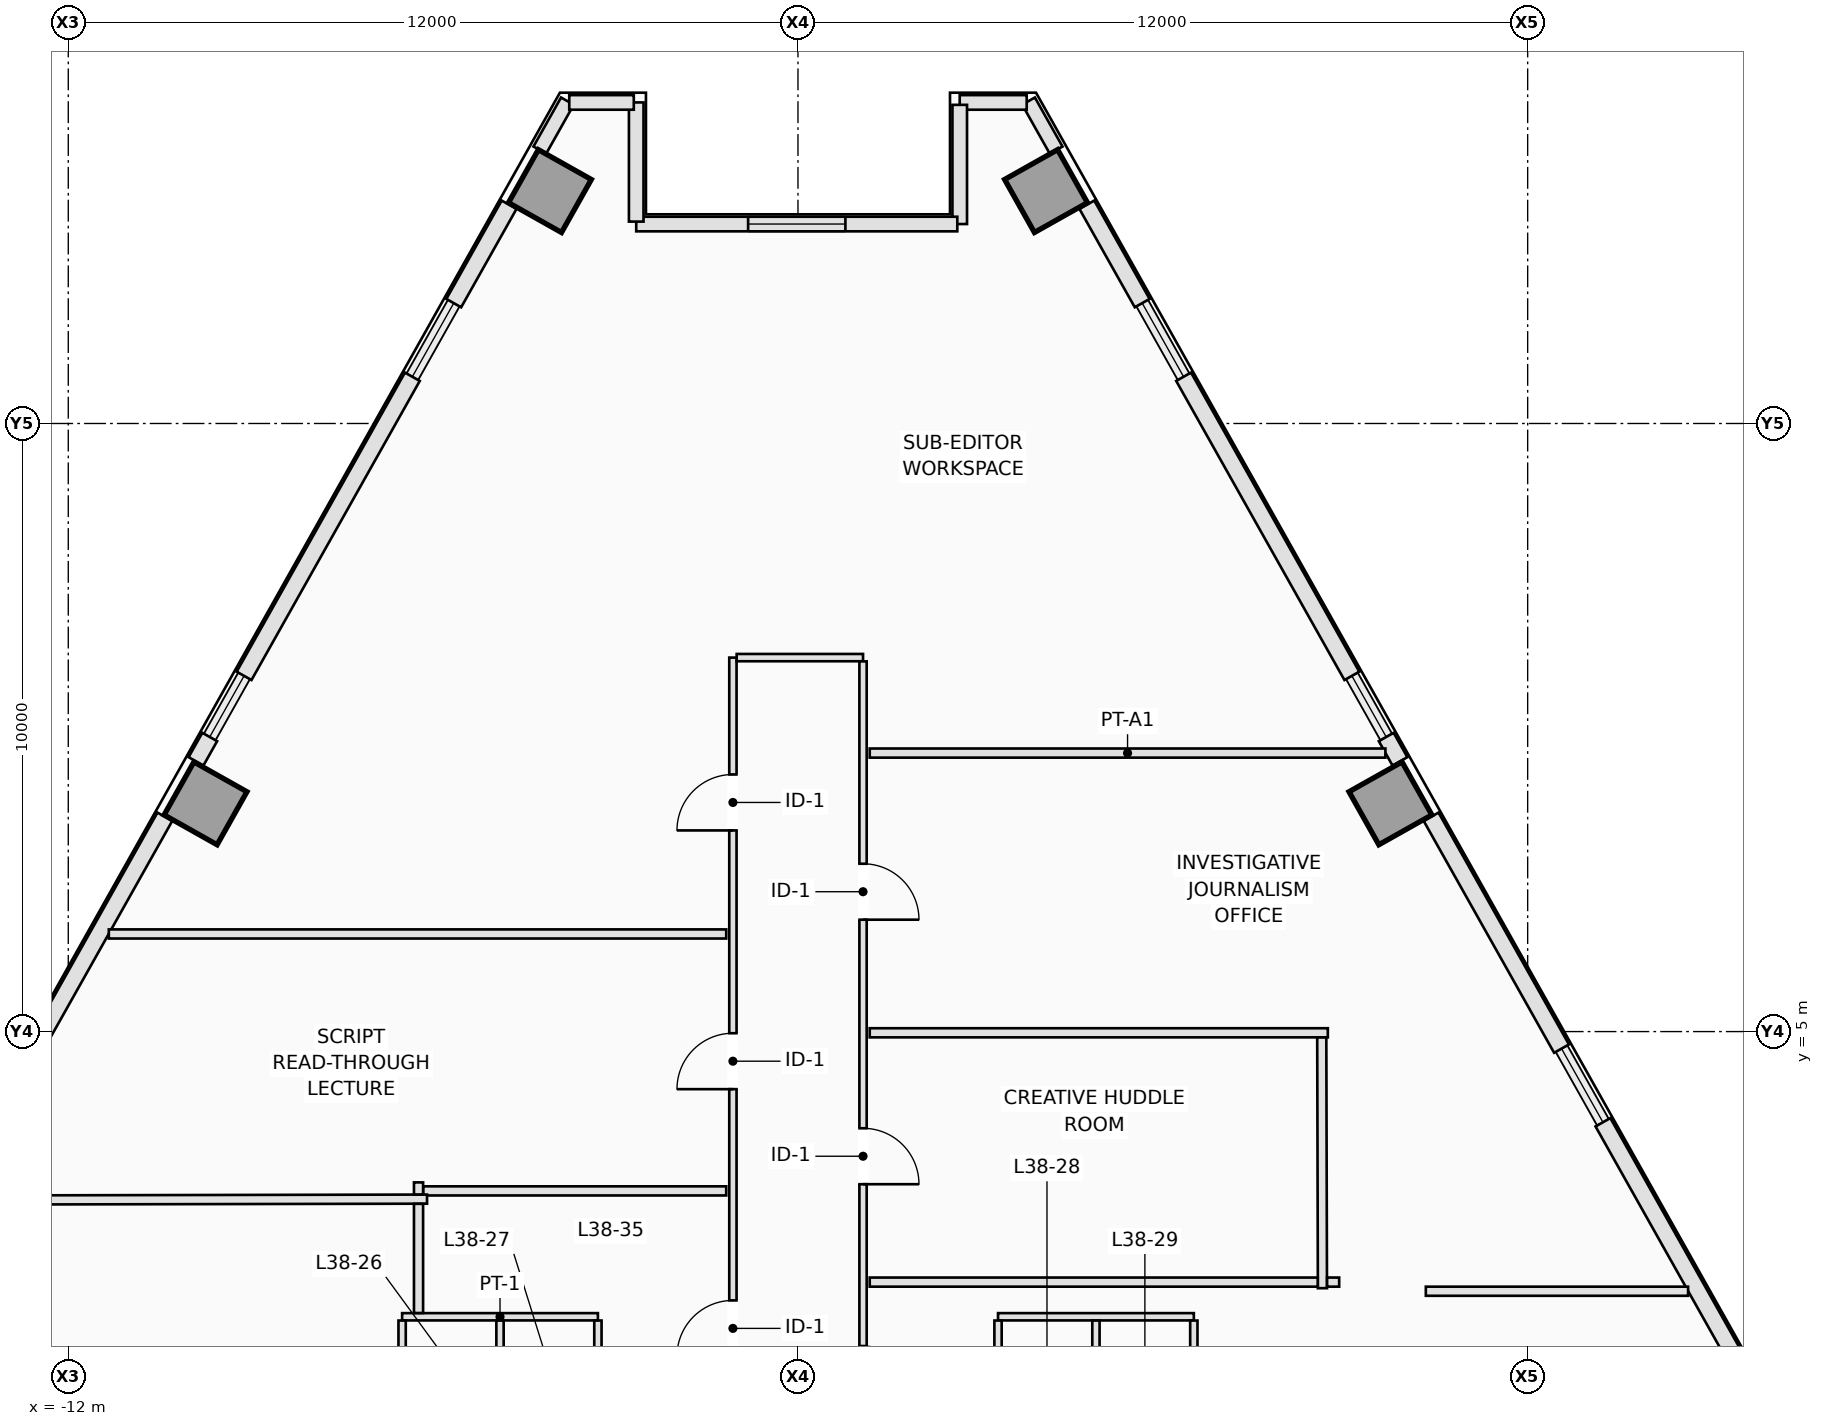
"""IFC4 building model, lengths in metres.
Left out: names, types, materials, properties, quantities, classifications, styles, units other than length and angle.
Written with IfcOpenShell. Run it as: python <this file> out.ifc"""

import sys

from ifc_helpers import new_model, si_unit, direction, frame, frame_2d, origin, origin_2d, place, context, subcontext, project, spatial, rectangle, extrude, element, fill, save


model = new_model("IFC4")
c1 = context("Model", 3, precision=1e-05, world=origin(), true_north=direction((0.0, 1.0)))
c2 = subcontext(c1, "Body", "Model", "MODEL_VIEW")
j1 = project(units=[si_unit("LENGTHUNIT", "METRE"), si_unit("PLANEANGLEUNIT", "RADIAN")], contexts=[c1])
p1 = place(None, origin())
s1 = spatial("IfcSite", under=j1, at=p1, CompositionType="ELEMENT")
p2 = place(p1, origin())
s2 = spatial("IfcBuilding", under=s1, at=p2, CompositionType="ELEMENT")
p3 = place(p2, frame((0.0, 0.0, 140.5)))
s3 = spatial("IfcBuildingStorey", under=s2, at=p3, CompositionType="ELEMENT", Elevation=140.5)
for number, where, z_axis, x_axis in (
    (1, (9.743, 8.753, 0.0), (0.0, 0.0, 1.0), (0.872, 0.49, 0.0)),
    (2, (4.079, 18.822, 0.0), (0.0, 0.0, 1.0), (0.872, 0.49, 0.0)),
    (3, (-4.079, 18.822, 0.0), (0.0, 0.0, 1.0), (-0.872, 0.49, 0.0)),
    (4, (-9.743, 8.753, 0.0), (0.0, 0.0, 1.0), (-0.872, 0.49, 0.0)),
):
    element("IfcColumn", number, at=place(p3, frame(where, z_axis=z_axis, x_axis=x_axis)), inside=s3, PredefinedType="COLUMN", context=c2, shape_type="SweptSolid", body=[
        extrude(rectangle(XDim=1.0, YDim=1.0, at=origin_2d()), origin(), (0.0, 0.0, 1.0), 3.5),
    ])
p4 = place(p3, frame((3.792, 20.302, 0.0), z_axis=(0.0, 0.0, 1.0), x_axis=(0.490048346303, -0.871695255399, 0.0)))
e5 = element("IfcWall", 5, at=p4, inside=s3, PredefinedType="STANDARD", context=c2, shape_type="SweptSolid", body=[
    extrude(rectangle(XDim=0.926, YDim=0.24, at=frame_2d((0.463, 0.0))), origin(), (0.0, 0.0, 1.0), 3.25),
])
p5 = place(p3, frame((4.751, 18.597, 0.0), z_axis=(0.0, 0.0, 1.0), x_axis=(0.490248749158, -0.871582562899, 0.0)))
e6 = element("IfcWall", 6, at=p5, inside=s3, PredefinedType="STANDARD", context=c2, shape_type="SweptSolid", body=[
    extrude(rectangle(XDim=1.856, YDim=0.28, at=frame_2d((0.928, 0.0))), origin(), (0.0, 0.0, 1.0), 3.25),
])
p6 = place(p3, frame((6.342, 15.768, 0.0), z_axis=(0.0, 0.0, 1.0), x_axis=(0.490289995219, -0.871559361483, 0.0)))
e7 = element("IfcWall", 7, at=p6, inside=s3, PredefinedType="STANDARD", context=c2, shape_type="SweptSolid", body=[
    extrude(rectangle(XDim=5.643, YDim=0.28, at=frame_2d((2.822, 0.0))), origin(), (0.0, 0.0, 1.0), 3.25),
])
p7 = place(p3, frame((9.674, 9.845, 0.0), z_axis=(0.0, 0.0, 1.0), x_axis=(0.490412424957, -0.871490478116, 0.0)))
e8 = element("IfcWall", 8, at=p7, inside=s3, PredefinedType="STANDARD", context=c2, shape_type="SweptSolid", body=[
    extrude(rectangle(XDim=0.46, YDim=0.28, at=frame_2d((0.23, 0.0))), origin(), (0.0, 0.0, 1.0), 3.25),
])
p8 = place(p3, frame((10.412, 8.533, 0.0), z_axis=(0.0, 0.0, 1.0), x_axis=(0.490274486291, -0.871568085747, 0.0)))
e9 = element("IfcWall", 9, at=p8, inside=s3, PredefinedType="STANDARD", context=c2, shape_type="SweptSolid", body=[
    extrude(rectangle(XDim=4.375, YDim=0.28, at=frame_2d((2.188, 0.0))), origin(), (0.0, 0.0, 1.0), 3.25),
])
p9 = place(p3, frame((13.238, 3.509, 0.0), z_axis=(0.0, 0.0, 1.0), x_axis=(0.490232095789, -0.871591929895, 0.0)))
e10 = element("IfcWall", 10, at=p9, inside=s3, PredefinedType="STANDARD", context=c2, shape_type="SweptSolid", body=[
    extrude(rectangle(XDim=4.375, YDim=0.28, at=frame_2d((2.188, 0.0))), origin(), (0.0, 0.0, 1.0), 3.25),
])
p10 = place(p3, frame((-4.246, 19.495, 0.0), z_axis=(0.0, 0.0, 1.0), x_axis=(0.490048346303, 0.871695255399, 0.0)))
e11 = element("IfcWall", 11, at=p10, inside=s3, PredefinedType="STANDARD", context=c2, shape_type="SweptSolid", body=[
    extrude(rectangle(XDim=0.926, YDim=0.24, at=frame_2d((0.463, 0.0))), origin(), (0.0, 0.0, 1.0), 3.25),
])
p11 = place(p3, frame((-9.9, 9.444, 0.0), z_axis=(0.0, 0.0, 1.0), x_axis=(0.490412424957, 0.871490478116, 0.0)))
e12 = element("IfcWall", 12, at=p11, inside=s3, PredefinedType="STANDARD", context=c2, shape_type="SweptSolid", body=[
    extrude(rectangle(XDim=0.46, YDim=0.28, at=frame_2d((0.23, 0.0))), origin(), (0.0, 0.0, 1.0), 3.25),
])
p12 = place(p3, frame((-9.109, 10.85, 0.0), z_axis=(0.0, 0.0, 1.0), x_axis=(0.490289995219, 0.871559361483, 0.0)))
e13 = element("IfcWall", 13, at=p12, inside=s3, PredefinedType="STANDARD", context=c2, shape_type="SweptSolid", body=[
    extrude(rectangle(XDim=5.643, YDim=0.28, at=frame_2d((2.822, 0.0))), origin(), (0.0, 0.0, 1.0), 3.25),
])
p13 = place(p3, frame((-5.661, 16.98, 0.0), z_axis=(0.0, 0.0, 1.0), x_axis=(0.490248749158, 0.871582562899, 0.0)))
e14 = element("IfcWall", 14, at=p13, inside=s3, PredefinedType="STANDARD", context=c2, shape_type="SweptSolid", body=[
    extrude(rectangle(XDim=1.856, YDim=0.28, at=frame_2d((0.928, 0.0))), origin(), (0.0, 0.0, 1.0), 3.25),
])
p14 = place(p3, frame((-12.557, 4.72, 0.0), z_axis=(0.0, 0.0, 1.0), x_axis=(0.490274486291, 0.871568085747, 0.0)))
e15 = element("IfcWall", 15, at=p14, inside=s3, PredefinedType="STANDARD", context=c2, shape_type="SweptSolid", body=[
    extrude(rectangle(XDim=4.375, YDim=0.28, at=frame_2d((2.188, 0.0))), origin(), (0.0, 0.0, 1.0), 3.25),
])
p15 = place(p3, frame((3.761, 20.28, 0.0), z_axis=(0.0, 0.0, 1.0), x_axis=(-1.0, 0.0, 0.0)))
e16 = element("IfcWall", 16, at=p15, inside=s3, PredefinedType="STANDARD", context=c2, shape_type="SweptSolid", body=[
    extrude(rectangle(XDim=1.102, YDim=0.24, at=frame_2d((0.551, 0.0))), origin(), (0.0, 0.0, 1.0), 3.25),
])
p16 = place(p3, frame((2.66, 20.24, 0.0), z_axis=(0.0, 0.0, 1.0), x_axis=(0.0, -1.0, 0.0)))
e17 = element("IfcWall", 17, at=p16, inside=s3, PredefinedType="STANDARD", context=c2, shape_type="SweptSolid", body=[
    extrude(rectangle(XDim=1.96, YDim=0.24, at=frame_2d((0.98, 0.0))), origin(), (0.0, 0.0, 1.0), 3.25),
])
p17 = place(p3, frame((2.62, 18.28, 0.0), z_axis=(0.0, 0.0, 1.0), x_axis=(-1.0, 0.0, 0.0)))
e18 = element("IfcWall", 18, at=p17, inside=s3, PredefinedType="STANDARD", context=c2, shape_type="SweptSolid", body=[
    extrude(rectangle(XDim=5.28, YDim=0.24, at=frame_2d((2.64, 0.0))), origin(), (0.0, 0.0, 1.0), 3.25),
])
p18 = place(p17, frame((1.84, 0.0, 0.9)))
e19 = element("IfcOpeningElement", 19, at=p18, cuts=e18, PredefinedType="OPENING", context=c2, shape_type="SweptSolid", body=[
    extrude(rectangle(XDim=1.6, YDim=2.1, at=frame_2d((0.8, 1.05))), frame((0.0, 0.13, 0.0), z_axis=(0.0, -1.0, 0.0), x_axis=(1.0, 0.0, 0.0)), (0.0, 0.0, 1.0), 0.26),
])
p19 = place(p3, frame((-2.66, 18.32, 0.0), z_axis=(0.0, 0.0, 1.0), x_axis=(0.0, 1.0, 0.0)))
e20 = element("IfcWall", 20, at=p19, inside=s3, PredefinedType="STANDARD", context=c2, shape_type="SweptSolid", body=[
    extrude(rectangle(XDim=1.96, YDim=0.24, at=frame_2d((0.98, 0.0))), origin(), (0.0, 0.0, 1.0), 3.25),
])
p20 = place(p3, frame((-2.7, 20.28, 0.0), z_axis=(0.0, 0.0, 1.0), x_axis=(-1.0, 0.0, 0.0)))
e21 = element("IfcWall", 21, at=p20, inside=s3, PredefinedType="STANDARD", context=c2, shape_type="SweptSolid", body=[
    extrude(rectangle(XDim=1.062, YDim=0.24, at=frame_2d((0.531, 0.0))), origin(), (0.0, 0.0, 1.0), 3.25),
])
p21 = place(p3, frame((-6.51, 0.31, 0.0), z_axis=(0.0, 0.0, 1.0), x_axis=(1.0, 0.0, 0.0)))
e22 = element("IfcWall", 22, at=p21, inside=s3, PredefinedType="PARTITIONING", context=c2, shape_type="SweptSolid", body=[
    extrude(rectangle(XDim=3.22, YDim=0.12, at=frame_2d((1.61, 0.0))), origin(), (0.0, 0.0, 1.0), 3.25),
])
for number, where, z_axis, x_axis in (
    (23, (-6.51, -2.378, 0.0), (0.0, 0.0, 1.0), (0.0, 1.0, 0.0)),
    (24, (-4.9, -2.378, 0.0), (0.0, 0.0, 1.0), (0.0, 1.0, 0.0)),
    (25, (-3.29, -2.378, 0.0), (0.0, 0.0, 1.0), (0.0, 1.0, 0.0)),
):
    element("IfcWall", number, at=place(p3, frame(where, z_axis=z_axis, x_axis=x_axis)), inside=s3, PredefinedType="PARTITIONING", context=c2, shape_type="SweptSolid", body=[
        extrude(rectangle(XDim=2.626, YDim=0.12, at=frame_2d((1.313, 0.0))), origin(), (0.0, 0.0, 1.0), 3.25),
    ])
p22 = place(p3, frame((3.29, 0.31, 0.0), z_axis=(0.0, 0.0, 1.0), x_axis=(1.0, 0.0, 0.0)))
e26 = element("IfcWall", 26, at=p22, inside=s3, PredefinedType="PARTITIONING", context=c2, shape_type="SweptSolid", body=[
    extrude(rectangle(XDim=3.22, YDim=0.12, at=frame_2d((1.61, 0.0))), origin(), (0.0, 0.0, 1.0), 3.25),
])
for number, where, z_axis, x_axis in (
    (27, (3.29, -2.378, 0.0), (0.0, 0.0, 1.0), (0.0, 1.0, 0.0)),
    (28, (4.9, -2.378, 0.0), (0.0, 0.0, 1.0), (0.0, 1.0, 0.0)),
    (29, (6.51, -2.378, 0.0), (0.0, 0.0, 1.0), (0.0, 1.0, 0.0)),
):
    element("IfcWall", number, at=place(p3, frame(where, z_axis=z_axis, x_axis=x_axis)), inside=s3, PredefinedType="PARTITIONING", context=c2, shape_type="SweptSolid", body=[
        extrude(rectangle(XDim=2.626, YDim=0.12, at=frame_2d((1.313, 0.0))), origin(), (0.0, 0.0, 1.0), 3.25),
    ])
p23 = place(p3, frame((-1.07, -2.338, 0.0), z_axis=(0.0, 0.0, 1.0), x_axis=(0.0, 1.0, 0.0)))
e30 = element("IfcWall", 30, at=p23, inside=s3, PredefinedType="PARTITIONING", context=c2, shape_type="SweptSolid", body=[
    extrude(rectangle(XDim=13.488, YDim=0.12, at=frame_2d((6.744, 0.0))), origin(), (0.0, 0.0, 1.0), 3.25),
])
p24 = place(p23, frame((10.646, 0.0, 0.0)))
e31 = element("IfcOpeningElement", 31, at=p24, cuts=e30, PredefinedType="OPENING", context=c2, shape_type="SweptSolid", body=[
    extrude(rectangle(XDim=0.92, YDim=2.12, at=frame_2d((0.46, 1.06))), frame((0.0, 0.07, 0.0), z_axis=(0.0, -1.0, 0.0), x_axis=(1.0, 0.0, 0.0)), (0.0, 0.0, 1.0), 0.14),
])
p25 = place(p23, frame((6.391, 0.0, 0.0)))
e32 = element("IfcOpeningElement", 32, at=p25, cuts=e30, PredefinedType="OPENING", context=c2, shape_type="SweptSolid", body=[
    extrude(rectangle(XDim=0.92, YDim=2.12, at=frame_2d((0.46, 1.06))), frame((0.0, 0.07, 0.0), z_axis=(0.0, -1.0, 0.0), x_axis=(1.0, 0.0, 0.0)), (0.0, 0.0, 1.0), 0.14),
])
p26 = place(p23, frame((1.997, 0.0, 0.0)))
e33 = element("IfcOpeningElement", 33, at=p26, cuts=e30, PredefinedType="OPENING", context=c2, shape_type="SweptSolid", body=[
    extrude(rectangle(XDim=0.92, YDim=2.12, at=frame_2d((0.46, 1.06))), frame((0.0, 0.07, 0.0), z_axis=(0.0, -1.0, 0.0), x_axis=(1.0, 0.0, 0.0)), (0.0, 0.0, 1.0), 0.14),
])
p27 = place(p3, frame((-1.008, 11.15, 0.0), z_axis=(0.0, 0.0, 1.0), x_axis=(1.0, 0.0, 0.0)))
e34 = element("IfcWall", 34, at=p27, inside=s3, PredefinedType="PARTITIONING", context=c2, shape_type="SweptSolid", body=[
    extrude(rectangle(XDim=2.078, YDim=0.12, at=frame_2d((1.039, 0.0))), origin(), (0.0, 0.0, 1.0), 3.25),
])
p28 = place(p3, frame((1.07, 11.088, 0.0), z_axis=(0.0, 0.0, 1.0), x_axis=(0.0, -1.0, 0.0)))
e35 = element("IfcWall", 35, at=p28, inside=s3, PredefinedType="PARTITIONING", context=c2, shape_type="SweptSolid", body=[
    extrude(rectangle(XDim=13.488, YDim=0.12, at=frame_2d((6.744, 0.0))), origin(), (0.0, 0.0, 1.0), 3.25),
])
p29 = place(p28, frame((3.328, 0.0, 0.0)))
e36 = element("IfcOpeningElement", 36, at=p29, cuts=e35, PredefinedType="OPENING", context=c2, shape_type="SweptSolid", body=[
    extrude(rectangle(XDim=0.92, YDim=2.12, at=frame_2d((0.46, 1.06))), frame((0.0, 0.07, 0.0), z_axis=(0.0, -1.0, 0.0), x_axis=(1.0, 0.0, 0.0)), (0.0, 0.0, 1.0), 0.14),
])
p30 = place(p28, frame((7.678, 0.0, 0.0)))
e37 = element("IfcOpeningElement", 37, at=p30, cuts=e35, PredefinedType="OPENING", context=c2, shape_type="SweptSolid", body=[
    extrude(rectangle(XDim=0.92, YDim=2.12, at=frame_2d((0.46, 1.06))), frame((0.0, 0.07, 0.0), z_axis=(0.0, -1.0, 0.0), x_axis=(1.0, 0.0, 0.0)), (0.0, 0.0, 1.0), 0.14),
])
p31 = place(p28, frame((11.259, 0.0, 0.0)))
e38 = element("IfcOpeningElement", 38, at=p31, cuts=e35, PredefinedType="OPENING", context=c2, shape_type="SweptSolid", body=[
    extrude(rectangle(XDim=0.92, YDim=2.12, at=frame_2d((0.46, 1.06))), frame((0.0, 0.07, 0.0), z_axis=(0.0, -1.0, 0.0), x_axis=(1.0, 0.0, 0.0)), (0.0, 0.0, 1.0), 0.14),
])
p32 = place(p3, frame((9.66, 9.58, 0.0), z_axis=(0.0, 0.0, 1.0), x_axis=(-1.0, 0.0, 0.0)))
e39 = element("IfcWall", 39, at=p32, inside=s3, PredefinedType="PARTITIONING", context=c2, shape_type="SweptSolid", body=[
    extrude(rectangle(XDim=8.48, YDim=0.15, at=frame_2d((4.24, 0.0))), origin(), (0.0, 0.0, 1.0), 3.25),
])
p33 = place(p3, frame((-1.18, 6.605, 0.0), z_axis=(0.0, 0.0, 1.0), x_axis=(-1.0, 0.0, 0.0)))
e40 = element("IfcWall", 40, at=p33, inside=s3, PredefinedType="PARTITIONING", context=c2, shape_type="SweptSolid", body=[
    extrude(rectangle(XDim=10.153, YDim=0.15, at=frame_2d((5.077, 0.0))), origin(), (0.0, 0.0, 1.0), 2.891),
])
p34 = place(p3, frame((8.714, 4.98, 0.0), z_axis=(0.0, 0.0, 1.0), x_axis=(-1.0, 0.0, 0.0)))
e41 = element("IfcWall", 41, at=p34, inside=s3, PredefinedType="PARTITIONING", context=c2, shape_type="SweptSolid", body=[
    extrude(rectangle(XDim=7.534, YDim=0.15, at=frame_2d((3.767, 0.0))), origin(), (0.0, 0.0, 1.0), 3.25),
])
p35 = place(p3, frame((8.625, 0.78, 0.0), z_axis=(0.0, 0.0, 1.0), x_axis=(-0.002664604467, 0.999996449935, 0.0)))
e42 = element("IfcWall", 42, at=p35, inside=s3, PredefinedType="PARTITIONING", context=c2, shape_type="SweptSolid", body=[
    extrude(rectangle(XDim=4.123, YDim=0.15, at=frame_2d((2.062, 0.0))), origin(), (0.0, 0.0, 1.0), 3.25),
])
p36 = place(p3, frame((14.638, 0.73, 0.0), z_axis=(0.0, 0.0, 1.0), x_axis=(-1.0, 0.0, 0.0)))
e43 = element("IfcWall", 43, at=p36, inside=s3, PredefinedType="PARTITIONING", context=c2, shape_type="SweptSolid", body=[
    extrude(rectangle(XDim=4.313, YDim=0.15, at=frame_2d((2.156, 0.0))), origin(), (0.0, 0.0, 1.0), 3.25),
])
p37 = place(p3, frame((-1.18, 2.38, 0.0), z_axis=(0.0, 0.0, 1.0), x_axis=(-1.0, 0.0, 0.0)))
e44 = element("IfcWall", 44, at=p37, inside=s3, PredefinedType="PARTITIONING", context=c2, shape_type="SweptSolid", body=[
    extrude(rectangle(XDim=4.985, YDim=0.15, at=frame_2d((2.492, 0.0))), origin(), (0.0, 0.0, 1.0), 3.25),
])
p38 = place(p3, frame((-6.1, 2.245, 0.0), z_axis=(0.0, 0.0, 1.0), x_axis=(-0.999998126996, -0.001935459776, 0.0)))
e45 = element("IfcWall", 45, at=p38, inside=s3, PredefinedType="PARTITIONING", context=c2, shape_type="SweptSolid", body=[
    extrude(rectangle(XDim=7.695, YDim=0.15, at=frame_2d((3.847, 0.0))), origin(), (0.0, 0.0, 1.0), 3.25),
])
p39 = place(p3, frame((8.9, 0.88, 0.0), z_axis=(0.0, 0.0, 1.0), x_axis=(-1.0, 0.0, 0.0)))
e46 = element("IfcWall", 46, at=p39, inside=s3, PredefinedType="PARTITIONING", context=c2, shape_type="SweptSolid", body=[
    extrude(rectangle(XDim=0.198, YDim=0.15, at=frame_2d((0.099, 0.0))), origin(), (0.0, 0.0, 1.0), 3.25),
])
p40 = place(p3, frame((8.548, 0.88, 0.0), z_axis=(0.0, 0.0, 1.0), x_axis=(-1.0, 0.0, 0.0)))
e47 = element("IfcWall", 47, at=p40, inside=s3, PredefinedType="PARTITIONING", context=c2, shape_type="SweptSolid", body=[
    extrude(rectangle(XDim=7.368, YDim=0.15, at=frame_2d((3.684, 0.0))), origin(), (0.0, 0.0, 1.0), 3.25),
])
p41 = place(p3, frame((-6.24, 0.372, 0.0), z_axis=(0.0, 0.0, 1.0), x_axis=(0.0, 1.0, 0.0)))
e48 = element("IfcWall", 48, at=p41, inside=s3, PredefinedType="PARTITIONING", context=c2, shape_type="SweptSolid", body=[
    extrude(rectangle(XDim=1.795, YDim=0.15, at=frame_2d((0.898, 0.0))), origin(), (0.0, 0.0, 1.0), 3.25),
])
p42 = place(p3, frame((-6.24, 2.321, 0.0), z_axis=(0.0, 0.0, 1.0), x_axis=(0.0, 1.0, 0.0)))
e49 = element("IfcWall", 49, at=p42, inside=s3, PredefinedType="PARTITIONING", context=c2, shape_type="SweptSolid", body=[
    extrude(rectangle(XDim=0.199, YDim=0.15, at=frame_2d((0.099, 0.0))), origin(), (0.0, 0.0, 1.0), 3.25),
])
p43 = place(p18, origin())
e50 = element("IfcWindow", 50, at=p43, inside=s3, PartitioningType="SINGLE_PANEL", PredefinedType="WINDOW", context=c2, shape_type="SweptSolid", body=[
    extrude(rectangle(XDim=1.6, YDim=2.1, at=frame_2d((0.8, 1.05))), frame((0.0, 0.03, 0.0), z_axis=(0.0, -1.0, 0.0), x_axis=(1.0, 0.0, 0.0)), (0.0, 0.0, 1.0), 0.06),
])
fill(e19, e50)
p44 = place(p24, origin())
e51 = element("IfcDoor", 51, at=p44, inside=s3, OperationType="SINGLE_SWING_LEFT", PredefinedType="DOOR", context=c2, shape_type="SweptSolid", body=[
    extrude(rectangle(XDim=0.92, YDim=2.12, at=frame_2d((0.46, 1.06))), frame((0.0, 0.025, 0.0), z_axis=(0.0, -1.0, 0.0), x_axis=(1.0, 0.0, 0.0)), (0.0, 0.0, 1.0), 0.05),
])
fill(e31, e51)
p45 = place(p29, origin())
e52 = element("IfcDoor", 52, at=p45, inside=s3, OperationType="SINGLE_SWING_RIGHT", PredefinedType="DOOR", context=c2, shape_type="SweptSolid", body=[
    extrude(rectangle(XDim=0.92, YDim=2.12, at=frame_2d((0.46, 1.06))), frame((0.0, 0.025, 0.0), z_axis=(0.0, -1.0, 0.0), x_axis=(1.0, 0.0, 0.0)), (0.0, 0.0, 1.0), 0.05),
])
fill(e36, e52)
p46 = place(p25, origin())
e53 = element("IfcDoor", 53, at=p46, inside=s3, OperationType="SINGLE_SWING_LEFT", PredefinedType="DOOR", context=c2, shape_type="SweptSolid", body=[
    extrude(rectangle(XDim=0.92, YDim=2.12, at=frame_2d((0.46, 1.06))), frame((0.0, 0.025, 0.0), z_axis=(0.0, -1.0, 0.0), x_axis=(1.0, 0.0, 0.0)), (0.0, 0.0, 1.0), 0.05),
])
fill(e32, e53)
p47 = place(p30, origin())
e54 = element("IfcDoor", 54, at=p47, inside=s3, OperationType="SINGLE_SWING_RIGHT", PredefinedType="DOOR", context=c2, shape_type="SweptSolid", body=[
    extrude(rectangle(XDim=0.92, YDim=2.12, at=frame_2d((0.46, 1.06))), frame((0.0, 0.025, 0.0), z_axis=(0.0, -1.0, 0.0), x_axis=(1.0, 0.0, 0.0)), (0.0, 0.0, 1.0), 0.05),
])
fill(e37, e54)
p48 = place(p26, origin())
e55 = element("IfcDoor", 55, at=p48, inside=s3, OperationType="SINGLE_SWING_LEFT", PredefinedType="DOOR", context=c2, shape_type="SweptSolid", body=[
    extrude(rectangle(XDim=0.92, YDim=2.12, at=frame_2d((0.46, 1.06))), frame((0.0, 0.025, 0.0), z_axis=(0.0, -1.0, 0.0), x_axis=(1.0, 0.0, 0.0)), (0.0, 0.0, 1.0), 0.05),
])
fill(e33, e55)
p49 = place(p31, origin())
e56 = element("IfcDoor", 56, at=p49, inside=s3, OperationType="SINGLE_SWING_RIGHT", PredefinedType="DOOR", context=c2, shape_type="SweptSolid", body=[
    extrude(rectangle(XDim=0.92, YDim=2.12, at=frame_2d((0.46, 1.06))), frame((0.0, 0.025, 0.0), z_axis=(0.0, -1.0, 0.0), x_axis=(1.0, 0.0, 0.0)), (0.0, 0.0, 1.0), 0.05),
])
fill(e38, e56)
save(model, sys.argv[1])
